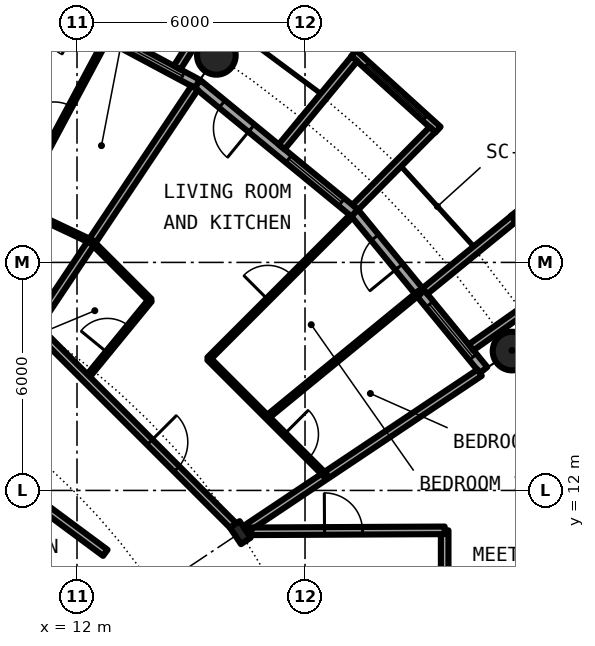
"""IFC4 building model, lengths in metres.
Left out: names, types, materials, properties, quantities, classifications, styles, units other than length and angle.
Written with IfcOpenShell. Run it as: python <this file> out.ifc"""

import sys

from ifc_helpers import new_model, si_unit, direction, frame, frame_2d, origin, origin_2d, place, context, subcontext, project, spatial, rectangle, circle, hollow_circle, i_section, extrude, element, fill, save


model = new_model("IFC4")
c1 = context("Model", 3, precision=1e-05, world=origin(), true_north=direction((0.0, 1.0)))
c2 = subcontext(c1, "Body", "Model", "MODEL_VIEW")
j1 = project(units=[si_unit("LENGTHUNIT", "METRE"), si_unit("PLANEANGLEUNIT", "RADIAN")], contexts=[c1])
p1 = place(None, origin())
s1 = spatial("IfcSite", under=j1, at=p1, CompositionType="ELEMENT")
p2 = place(p1, origin())
s2 = spatial("IfcBuilding", under=s1, at=p2, CompositionType="ELEMENT")
p3 = place(p2, frame((0.0, 0.0, 75.8)))
s3 = spatial("IfcBuildingStorey", under=s2, at=p3, CompositionType="ELEMENT", Elevation=75.8)
for number, where, z_axis, x_axis in (
    (1, (23.448, 15.667, 0.0), (0.0, 0.0, 1.0), (1.0, 0.0, 0.0)),
    (2, (15.667, 23.448, 0.0), (0.0, 0.0, 1.0), (1.0, 0.0, 0.0)),
):
    element("IfcColumn", number, at=place(p3, frame(where, z_axis=z_axis, x_axis=x_axis)), inside=s3, PredefinedType="COLUMN", context=c2, shape_type="SweptSolid", body=[
        extrude(hollow_circle(Radius=0.508, WallThickness=0.04, at=origin_2d()), origin(), (0.0, 0.0, 1.0), 3.05),
    ])
p4 = place(p3, frame((16.297, 10.889, 0.0), z_axis=(0.0, 0.0, 1.0), x_axis=(0.831469612303, 0.55557023302, 0.0)))
e3 = element("IfcColumn", 3, at=p4, inside=s3, PredefinedType="COLUMN", context=c2, shape_type="SweptSolid", body=[
    extrude(i_section(OverallWidth=0.306, OverallDepth=0.524, WebThickness=0.021, FlangeThickness=0.04, FilletRadius=0.027, at=origin_2d()), origin(), (0.0, 0.0, 1.0), 3.05),
])
p5 = place(p3, frame((22.699, 15.167, 0.0), z_axis=(0.0, 0.0, 1.0), x_axis=(-0.634382322723, 0.773019449054, 0.0)))
e4 = element("IfcWall", 4, at=p5, inside=s3, PredefinedType="SOLIDWALL", context=c2, shape_type="SweptSolid", body=[
    extrude(rectangle(XDim=5.352, YDim=0.25, at=frame_2d((2.676, 0.0))), origin(), (0.0, 0.0, 1.0), 2.7),
])
p6 = place(p5, frame((0.441, 0.0, 0.3)))
e5 = element("IfcOpeningElement", 5, at=p6, cuts=e4, PredefinedType="OPENING", context=c2, shape_type="SweptSolid", body=[
    extrude(rectangle(XDim=1.8, YDim=2.1, at=frame_2d((0.9, 1.05))), frame((0.0, 0.135, 0.0), z_axis=(0.0, -1.0, 0.0), x_axis=(1.0, 0.0, 0.0)), (0.0, 0.0, 1.0), 0.27),
])
p7 = place(p5, frame((3.51, 0.0, 0.0)))
e6 = element("IfcOpeningElement", 6, at=p7, cuts=e4, PredefinedType="OPENING", context=c2, shape_type="SweptSolid", body=[
    extrude(rectangle(XDim=1.0, YDim=2.2, at=frame_2d((0.5, 1.1))), frame((0.0, 0.135, 0.0), z_axis=(0.0, -1.0, 0.0), x_axis=(1.0, 0.0, 0.0)), (0.0, 0.0, 1.0), 0.27),
])
p8 = place(p3, frame((24.909, 17.427, -0.03), z_axis=(0.0, 0.0, 1.0), x_axis=(-0.60418752353, 0.796842165306, 0.0)))
e7 = element("IfcWall", 7, at=p8, inside=s3, PredefinedType="SOLIDWALL", context=c2, shape_type="SweptSolid", body=[
    extrude(rectangle(XDim=2.337, YDim=0.2, at=frame_2d((1.168, 0.0))), origin(), (0.0, 0.0, 1.0), 2.73),
])
p9 = place(p8, frame((0.128, 0.0, 0.33)))
e8 = element("IfcOpeningElement", 8, at=p9, cuts=e7, PredefinedType="OPENING", context=c2, shape_type="SweptSolid", body=[
    extrude(circle(Radius=1.04, at=frame_2d((1.04, 1.04))), frame((0.0, 0.11, 0.0), z_axis=(0.0, -1.0, 0.0), x_axis=(1.0, 0.0, 0.0)), (0.0, 0.0, 1.0), 0.22),
])
p10 = place(p3, frame((22.37, 15.765, -0.03), z_axis=(0.0, 0.0, 1.0), x_axis=(0.817256123454, 0.576274612209, 0.0)))
e9 = element("IfcWall", 9, at=p10, inside=s3, PredefinedType="SOLIDWALL", context=c2, shape_type="SweptSolid", body=[
    extrude(rectangle(XDim=2.933, YDim=0.2, at=frame_2d((1.466, 0.0))), origin(), (0.0, 0.0, 1.0), 2.73),
])
p11 = place(p3, frame((21.155, 17.246, -0.03), z_axis=(0.0, 0.0, 1.0), x_axis=(0.775179004516, 0.631741648902, 0.0)))
e10 = element("IfcWall", 10, at=p11, inside=s3, PredefinedType="SOLIDWALL", context=c2, shape_type="SweptSolid", body=[
    extrude(rectangle(XDim=3.006, YDim=0.2, at=frame_2d((1.503, 0.0))), origin(), (0.0, 0.0, 1.0), 2.73),
])
p12 = place(p3, frame((19.304, 19.304, 0.0), z_axis=(0.0, 0.0, 1.0), x_axis=(-0.773019449054, 0.634382322723, 0.0)))
e11 = element("IfcWall", 11, at=p12, inside=s3, PredefinedType="SOLIDWALL", context=c2, shape_type="SweptSolid", body=[
    extrude(rectangle(XDim=5.352, YDim=0.25, at=frame_2d((2.676, 0.0))), origin(), (0.0, 0.0, 1.0), 2.7),
])
p13 = place(p12, frame((0.441, 0.0, 0.3)))
e12 = element("IfcOpeningElement", 12, at=p13, cuts=e11, PredefinedType="OPENING", context=c2, shape_type="SweptSolid", body=[
    extrude(rectangle(XDim=1.8, YDim=2.1, at=frame_2d((0.9, 1.05))), frame((0.0, 0.135, 0.0), z_axis=(0.0, -1.0, 0.0), x_axis=(1.0, 0.0, 0.0)), (0.0, 0.0, 1.0), 0.27),
])
p14 = place(p12, frame((3.51, 0.0, 0.0)))
e13 = element("IfcOpeningElement", 13, at=p14, cuts=e11, PredefinedType="OPENING", context=c2, shape_type="SweptSolid", body=[
    extrude(rectangle(XDim=1.0, YDim=2.2, at=frame_2d((0.5, 1.1))), frame((0.0, 0.135, 0.0), z_axis=(0.0, -1.0, 0.0), x_axis=(1.0, 0.0, 0.0)), (0.0, 0.0, 1.0), 0.27),
])
p15 = place(p3, frame((21.5, 21.493, -0.03), z_axis=(0.0, 0.0, 1.0), x_axis=(-0.740998365753, 0.671506829416, 0.0)))
e14 = element("IfcWall", 14, at=p15, inside=s3, PredefinedType="SOLIDWALL", context=c2, shape_type="SweptSolid", body=[
    extrude(rectangle(XDim=2.993, YDim=0.2, at=frame_2d((1.497, 0.0))), origin(), (0.0, 0.0, 1.0), 2.73),
])
p16 = place(p15, frame((0.457, 0.0, 0.33)))
e15 = element("IfcOpeningElement", 15, at=p16, cuts=e14, PredefinedType="OPENING", context=c2, shape_type="SweptSolid", body=[
    extrude(circle(Radius=1.04, at=frame_2d((1.04, 1.04))), frame((0.0, 0.11, 0.0), z_axis=(0.0, -1.0, 0.0), x_axis=(1.0, 0.0, 0.0)), (0.0, 0.0, 1.0), 0.22),
])
p17 = place(p3, frame((19.323, 19.45, -0.03), z_axis=(0.0, 0.0, 1.0), x_axis=(0.704476739375, 0.709727076896, 0.0)))
e16 = element("IfcWall", 16, at=p17, inside=s3, PredefinedType="SOLIDWALL", context=c2, shape_type="SweptSolid", body=[
    extrude(rectangle(XDim=2.883, YDim=0.2, at=frame_2d((1.441, 0.0))), origin(), (0.0, 0.0, 1.0), 2.73),
])
p18 = place(p3, frame((17.384, 21.041, -0.03), z_axis=(0.0, 0.0, 1.0), x_axis=(0.63709551667, 0.770784861449, 0.0)))
e17 = element("IfcWall", 17, at=p18, inside=s3, PredefinedType="SOLIDWALL", context=c2, shape_type="SweptSolid", body=[
    extrude(rectangle(XDim=3.006, YDim=0.2, at=frame_2d((1.503, 0.0))), origin(), (0.0, 0.0, 1.0), 2.73),
])
p19 = place(p3, frame((15.167, 22.699, 0.0), z_axis=(0.0, 0.0, 1.0), x_axis=(-0.881915646801, 0.471407246368, 0.0)))
e18 = element("IfcWall", 18, at=p19, inside=s3, PredefinedType="SOLIDWALL", context=c2, shape_type="SweptSolid", body=[
    extrude(rectangle(XDim=5.352, YDim=0.25, at=frame_2d((2.676, 0.0))), origin(), (0.0, 0.0, 1.0), 2.7),
])
p20 = place(p19, frame((0.441, 0.0, 0.3)))
e19 = element("IfcOpeningElement", 19, at=p20, cuts=e18, PredefinedType="OPENING", context=c2, shape_type="SweptSolid", body=[
    extrude(rectangle(XDim=1.8, YDim=2.1, at=frame_2d((0.9, 1.05))), frame((0.0, 0.135, 0.0), z_axis=(0.0, -1.0, 0.0), x_axis=(1.0, 0.0, 0.0)), (0.0, 0.0, 1.0), 0.27),
])
p21 = place(p19, frame((3.51, 0.0, 0.0)))
e20 = element("IfcOpeningElement", 20, at=p21, cuts=e18, PredefinedType="OPENING", context=c2, shape_type="SweptSolid", body=[
    extrude(rectangle(XDim=1.0, YDim=2.2, at=frame_2d((0.5, 1.1))), frame((0.0, 0.135, 0.0), z_axis=(0.0, -1.0, 0.0), x_axis=(1.0, 0.0, 0.0)), (0.0, 0.0, 1.0), 0.27),
])
p22 = place(p3, frame((14.635, 23.126, -0.03), z_axis=(0.0, 0.0, 1.0), x_axis=(0.534437802731, 0.845207805816, 0.0)))
e21 = element("IfcWall", 21, at=p22, inside=s3, PredefinedType="SOLIDWALL", context=c2, shape_type="SweptSolid", body=[
    extrude(rectangle(XDim=2.932, YDim=0.2, at=frame_2d((1.466, 0.0))), origin(), (0.0, 0.0, 1.0), 2.73),
])
p23 = place(p3, frame((21.675, 9.3, 0.0), z_axis=(0.0, 0.0, 1.0), x_axis=(0.0, 1.0, 0.0)))
e22 = element("IfcWall", 22, at=p23, inside=s3, PredefinedType="PARTITIONING", context=c2, shape_type="SweptSolid", body=[
    extrude(rectangle(XDim=1.65, YDim=0.2, at=frame_2d((0.825, 0.0))), origin(), (0.0, 0.0, 1.0), 2.7),
])
p24 = place(p3, frame((10.417, 19.474, 0.0), z_axis=(0.0, 0.0, 1.0), x_axis=(0.471755462896, 0.881729427448, 0.0)))
e23 = element("IfcWall", 23, at=p24, inside=s3, PredefinedType="PARTITIONING", context=c2, shape_type="SweptSolid", body=[
    extrude(rectangle(XDim=5.09, YDim=0.1, at=frame_2d((2.545, 0.0))), origin(), (0.0, 0.0, 1.0), 2.7),
])
p25 = place(p24, frame((2.095, 0.0, 0.0)))
e24 = element("IfcOpeningElement", 24, at=p25, cuts=e23, PredefinedType="OPENING", context=c2, shape_type="SweptSolid", body=[
    extrude(rectangle(XDim=0.9, YDim=2.3, at=frame_2d((0.45, 1.15))), frame((0.0, 0.06, 0.0), z_axis=(0.0, -1.0, 0.0), x_axis=(1.0, 0.0, 0.0)), (0.0, 0.0, 1.0), 0.12),
])
p26 = place(p3, frame((11.035, 16.515, 0.0), z_axis=(0.0, 0.0, 1.0), x_axis=(0.555516661303, 0.831505405283, 0.0)))
e25 = element("IfcWall", 25, at=p26, inside=s3, PredefinedType="PARTITIONING", context=c2, shape_type="SweptSolid", body=[
    extrude(rectangle(XDim=7.312, YDim=0.2, at=frame_2d((3.656, 0.0))), origin(), (0.0, 0.0, 1.0), 2.7),
])
p27 = place(p3, frame((12.241, 14.945, 0.0), z_axis=(0.0, 0.0, 1.0), x_axis=(0.633582447834, 0.77367517848, 0.0)))
e26 = element("IfcWall", 26, at=p27, inside=s3, PredefinedType="PARTITIONING", context=c2, shape_type="SweptSolid", body=[
    extrude(rectangle(XDim=2.661, YDim=0.1, at=frame_2d((1.331, 0.0))), origin(), (0.0, 0.0, 1.0), 2.7),
])
p28 = place(p27, frame((0.881, 0.0, 0.0)))
e27 = element("IfcOpeningElement", 27, at=p28, cuts=e26, PredefinedType="OPENING", context=c2, shape_type="SweptSolid", body=[
    extrude(rectangle(XDim=0.9, YDim=2.3, at=frame_2d((0.45, 1.15))), frame((0.0, 0.06, 0.0), z_axis=(0.0, -1.0, 0.0), x_axis=(1.0, 0.0, 0.0)), (0.0, 0.0, 1.0), 0.12),
])
p29 = place(p3, frame((15.465, 15.465, 0.0), z_axis=(0.0, 0.0, 1.0), x_axis=(0.707106781187, 0.707106781187, 0.0)))
e28 = element("IfcWall", 28, at=p29, inside=s3, PredefinedType="PARTITIONING", context=c2, shape_type="SweptSolid", body=[
    extrude(rectangle(XDim=5.305, YDim=0.1, at=frame_2d((2.652, 0.0))), origin(), (0.0, 0.0, 1.0), 2.7),
])
p30 = place(p29, frame((2.202, 0.0, 0.0)))
e29 = element("IfcOpeningElement", 29, at=p30, cuts=e28, PredefinedType="OPENING", context=c2, shape_type="SweptSolid", body=[
    extrude(rectangle(XDim=0.9, YDim=2.3, at=frame_2d((0.45, 1.15))), frame((0.0, 0.06, 0.0), z_axis=(0.0, -1.0, 0.0), x_axis=(1.0, 0.0, 0.0)), (0.0, 0.0, 1.0), 0.12),
])
p31 = place(p3, frame((16.515, 11.034, 0.0), z_axis=(0.0, 0.0, 1.0), x_axis=(0.831382022135, 0.555701298605, 0.0)))
e30 = element("IfcWall", 30, at=p31, inside=s3, PredefinedType="PARTITIONING", context=c2, shape_type="SweptSolid", body=[
    extrude(rectangle(XDim=7.313, YDim=0.2, at=frame_2d((3.657, 0.0))), origin(), (0.0, 0.0, 1.0), 2.7),
])
p32 = place(p3, frame((17.004, 13.927, 0.0), z_axis=(0.0, 0.0, 1.0), x_axis=(0.773517471898, 0.633774976367, 0.0)))
e31 = element("IfcWall", 31, at=p32, inside=s3, PredefinedType="PARTITIONING", context=c2, shape_type="SweptSolid", body=[
    extrude(rectangle(XDim=5.196, YDim=0.1, at=frame_2d((2.598, 0.0))), origin(), (0.0, 0.0, 1.0), 2.7),
])
p33 = place(p3, frame((16.588, 10.925, 0.0), z_axis=(0.0, 0.0, 1.0), x_axis=(0.999988019025, 0.004895079807, 0.0)))
e32 = element("IfcWall", 32, at=p33, inside=s3, PredefinedType="PARTITIONING", context=c2, shape_type="SweptSolid", body=[
    extrude(rectangle(XDim=5.087, YDim=0.2, at=frame_2d((2.543, 0.0))), origin(), (0.0, 0.0, 1.0), 2.7),
])
p34 = place(p33, frame((1.925, 0.0, 0.0)))
e33 = element("IfcOpeningElement", 33, at=p34, cuts=e32, PredefinedType="OPENING", context=c2, shape_type="SweptSolid", body=[
    extrude(rectangle(XDim=1.0, YDim=2.3, at=frame_2d((0.5, 1.15))), frame((0.0, 0.11, 0.0), z_axis=(0.0, -1.0, 0.0), x_axis=(1.0, 0.0, 0.0)), (0.0, 0.0, 1.0), 0.22),
])
p35 = place(p3, frame((4.906, 16.172, 0.0), z_axis=(0.0, 0.0, 1.0), x_axis=(0.803191461888, -0.595720971219, 0.0)))
e34 = element("IfcWall", 34, at=p35, inside=s3, PredefinedType="PARTITIONING", context=c2, shape_type="SweptSolid", body=[
    extrude(rectangle(XDim=9.76, YDim=0.2, at=frame_2d((4.88, 0.0))), origin(), (0.0, 0.0, 1.0), 2.7),
])
p36 = place(p35, frame((4.38, 0.0, 0.0)))
e35 = element("IfcOpeningElement", 35, at=p36, cuts=e34, PredefinedType="OPENING", context=c2, shape_type="SweptSolid", body=[
    extrude(rectangle(XDim=1.0, YDim=2.3, at=frame_2d((0.5, 1.15))), frame((0.0, 0.11, 0.0), z_axis=(0.0, -1.0, 0.0), x_axis=(1.0, 0.0, 0.0)), (0.0, 0.0, 1.0), 0.22),
])
p37 = place(p3, frame((11.0, 16.186, 0.0), z_axis=(0.0, 0.0, 1.0), x_axis=(0.707106781187, -0.707106781187, 0.0)))
e36 = element("IfcWall", 36, at=p37, inside=s3, PredefinedType="PARTITIONING", context=c2, shape_type="SweptSolid", body=[
    extrude(rectangle(XDim=7.334, YDim=0.2, at=frame_2d((3.667, 0.0))), origin(), (0.0, 0.0, 1.0), 2.38),
])
p38 = place(p37, frame((4.123, 0.0, 0.0)))
e37 = element("IfcOpeningElement", 37, at=p38, cuts=e36, PredefinedType="OPENING", context=c2, shape_type="SweptSolid", body=[
    extrude(rectangle(XDim=1.0, YDim=2.3, at=frame_2d((0.5, 1.15))), frame((0.0, 0.11, 0.0), z_axis=(0.0, -1.0, 0.0), x_axis=(1.0, 0.0, 0.0)), (0.0, 0.0, 1.0), 0.22),
])
p39 = place(p3, frame((12.385, 18.544, 0.0), z_axis=(0.0, 0.0, 1.0), x_axis=(0.707387256653, -0.706826194425, 0.0)))
e38 = element("IfcWall", 38, at=p39, inside=s3, PredefinedType="PARTITIONING", context=c2, shape_type="SweptSolid", body=[
    extrude(rectangle(XDim=2.176, YDim=0.1, at=frame_2d((1.088, 0.0))), origin(), (0.0, 0.0, 1.0), 2.7),
])
p40 = place(p3, frame((15.465, 15.465, 0.0), z_axis=(0.0, 0.0, 1.0), x_axis=(0.707190945535, -0.707022606819, 0.0)))
e39 = element("IfcWall", 39, at=p40, inside=s3, PredefinedType="PARTITIONING", context=c2, shape_type="SweptSolid", body=[
    extrude(rectangle(XDim=4.351, YDim=0.1, at=frame_2d((2.175, 0.0))), origin(), (0.0, 0.0, 1.0), 2.7),
])
p41 = place(p40, frame((2.812, 0.0, 0.0)))
e40 = element("IfcOpeningElement", 40, at=p41, cuts=e39, PredefinedType="OPENING", context=c2, shape_type="SweptSolid", body=[
    extrude(rectangle(XDim=0.9, YDim=2.3, at=frame_2d((0.45, 1.15))), frame((0.0, 0.06, 0.0), z_axis=(0.0, -1.0, 0.0), x_axis=(1.0, 0.0, 0.0)), (0.0, 0.0, 1.0), 0.12),
])
p42 = place(p3, frame((10.417, 19.474, 0.0), z_axis=(0.0, 0.0, 1.0), x_axis=(0.904081702397, -0.427359655782, 0.0)))
e41 = element("IfcWall", 41, at=p42, inside=s3, PredefinedType="PARTITIONING", context=c2, shape_type="SweptSolid", body=[
    extrude(rectangle(XDim=2.181, YDim=0.1, at=frame_2d((1.091, 0.0))), origin(), (0.0, 0.0, 1.0), 2.7),
])
p43 = place(p6, origin())
e42 = element("IfcWindow", 42, at=p43, inside=s3, PartitioningType="SINGLE_PANEL", PredefinedType="WINDOW", context=c2, shape_type="SweptSolid", body=[
    extrude(rectangle(XDim=1.8, YDim=2.1, at=frame_2d((0.9, 1.05))), frame((0.0, 0.03, 0.0), z_axis=(0.0, -1.0, 0.0), x_axis=(1.0, 0.0, 0.0)), (0.0, 0.0, 1.0), 0.06),
])
fill(e5, e42)
p44 = place(p7, origin())
e43 = element("IfcDoor", 43, at=p44, inside=s3, OperationType="SINGLE_SWING_LEFT", PredefinedType="DOOR", context=c2, shape_type="SweptSolid", body=[
    extrude(rectangle(XDim=1.0, YDim=2.2, at=frame_2d((0.5, 1.1))), frame((0.0, 0.025, 0.0), z_axis=(0.0, -1.0, 0.0), x_axis=(1.0, 0.0, 0.0)), (0.0, 0.0, 1.0), 0.05),
])
fill(e6, e43)
p45 = place(p13, origin())
e44 = element("IfcWindow", 44, at=p45, inside=s3, PartitioningType="SINGLE_PANEL", PredefinedType="WINDOW", context=c2, shape_type="SweptSolid", body=[
    extrude(rectangle(XDim=1.8, YDim=2.1, at=frame_2d((0.9, 1.05))), frame((0.0, 0.03, 0.0), z_axis=(0.0, -1.0, 0.0), x_axis=(1.0, 0.0, 0.0)), (0.0, 0.0, 1.0), 0.06),
])
fill(e12, e44)
p46 = place(p16, origin())
e45 = element("IfcWindow", 45, at=p46, inside=s3, PartitioningType="SINGLE_PANEL", PredefinedType="WINDOW", context=c2, shape_type="SweptSolid", body=[
    extrude(circle(Radius=1.04, at=frame_2d((1.04, 1.04))), frame((0.0, 0.03, 0.0), z_axis=(0.0, -1.0, 0.0), x_axis=(1.0, 0.0, 0.0)), (0.0, 0.0, 1.0), 0.06),
])
fill(e15, e45)
p47 = place(p14, origin())
e46 = element("IfcDoor", 46, at=p47, inside=s3, OperationType="SINGLE_SWING_LEFT", PredefinedType="DOOR", context=c2, shape_type="SweptSolid", body=[
    extrude(rectangle(XDim=1.0, YDim=2.2, at=frame_2d((0.5, 1.1))), frame((0.0, 0.025, 0.0), z_axis=(0.0, -1.0, 0.0), x_axis=(1.0, 0.0, 0.0)), (0.0, 0.0, 1.0), 0.05),
])
fill(e13, e46)
p48 = place(p20, origin())
e47 = element("IfcWindow", 47, at=p48, inside=s3, PartitioningType="SINGLE_PANEL", PredefinedType="WINDOW", context=c2, shape_type="SweptSolid", body=[
    extrude(rectangle(XDim=1.8, YDim=2.1, at=frame_2d((0.9, 1.05))), frame((0.0, 0.03, 0.0), z_axis=(0.0, -1.0, 0.0), x_axis=(1.0, 0.0, 0.0)), (0.0, 0.0, 1.0), 0.06),
])
fill(e19, e47)
p49 = place(p38, origin())
e48 = element("IfcDoor", 48, at=p49, inside=s3, OperationType="SINGLE_SWING_RIGHT", PredefinedType="DOOR", context=c2, shape_type="SweptSolid", body=[
    extrude(rectangle(XDim=1.0, YDim=2.3, at=frame_2d((0.5, 1.15))), frame((0.0, 0.025, 0.0), z_axis=(0.0, -1.0, 0.0), x_axis=(1.0, 0.0, 0.0)), (0.0, 0.0, 1.0), 0.05),
])
fill(e37, e48)
p50 = place(p28, origin())
e49 = element("IfcDoor", 49, at=p50, inside=s3, OperationType="SINGLE_SWING_LEFT", PredefinedType="DOOR", context=c2, shape_type="SweptSolid", body=[
    extrude(rectangle(XDim=0.9, YDim=2.3, at=frame_2d((0.45, 1.15))), frame((0.0, 0.025, 0.0), z_axis=(0.0, -1.0, 0.0), x_axis=(1.0, 0.0, 0.0)), (0.0, 0.0, 1.0), 0.05),
])
fill(e27, e49)
p51 = place(p30, origin())
e50 = element("IfcDoor", 50, at=p51, inside=s3, OperationType="SINGLE_SWING_RIGHT", PredefinedType="DOOR", context=c2, shape_type="SweptSolid", body=[
    extrude(rectangle(XDim=0.9, YDim=2.3, at=frame_2d((0.45, 1.15))), frame((0.0, 0.025, 0.0), z_axis=(0.0, -1.0, 0.0), x_axis=(1.0, 0.0, 0.0)), (0.0, 0.0, 1.0), 0.05),
])
fill(e29, e50)
p52 = place(p41, origin())
e51 = element("IfcDoor", 51, at=p52, inside=s3, OperationType="SINGLE_SWING_RIGHT", PredefinedType="DOOR", context=c2, shape_type="SweptSolid", body=[
    extrude(rectangle(XDim=0.9, YDim=2.3, at=frame_2d((0.45, 1.15))), frame((0.0, 0.025, 0.0), z_axis=(0.0, -1.0, 0.0), x_axis=(1.0, 0.0, 0.0)), (0.0, 0.0, 1.0), 0.05),
])
fill(e40, e51)
p53 = place(p25, origin())
e52 = element("IfcDoor", 52, at=p53, inside=s3, OperationType="SINGLE_SWING_LEFT", PredefinedType="DOOR", context=c2, shape_type="SweptSolid", body=[
    extrude(rectangle(XDim=0.9, YDim=2.3, at=frame_2d((0.45, 1.15))), frame((0.0, 0.025, 0.0), z_axis=(0.0, -1.0, 0.0), x_axis=(1.0, 0.0, 0.0)), (0.0, 0.0, 1.0), 0.05),
])
fill(e24, e52)
p54 = place(p34, origin())
e53 = element("IfcDoor", 53, at=p54, inside=s3, OperationType="SINGLE_SWING_LEFT", PredefinedType="DOOR", context=c2, shape_type="SweptSolid", body=[
    extrude(rectangle(XDim=1.0, YDim=2.3, at=frame_2d((0.5, 1.15))), frame((0.0, 0.025, 0.0), z_axis=(0.0, -1.0, 0.0), x_axis=(1.0, 0.0, 0.0)), (0.0, 0.0, 1.0), 0.05),
])
fill(e33, e53)
save(model, sys.argv[1])
